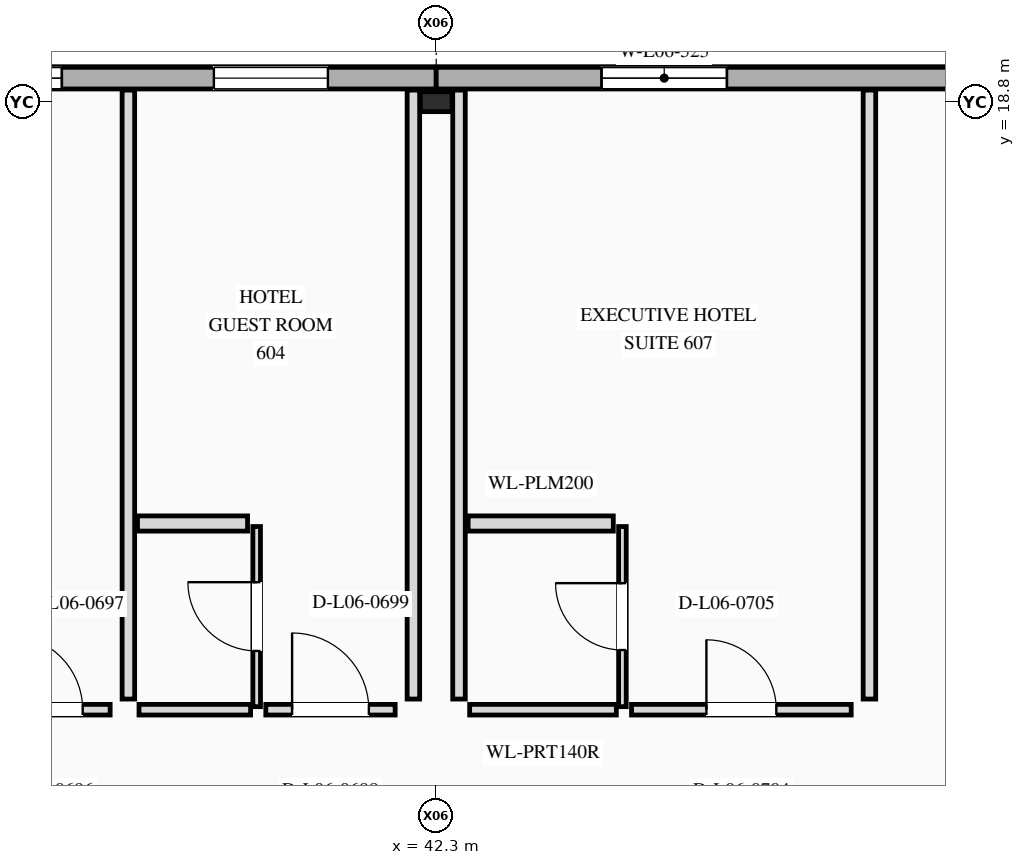
"""IFC4 building model, lengths in metres.
Left out: names, types, materials, properties, quantities, classifications, styles, units other than length and angle.
Written with IfcOpenShell. Run it as: python <this file> out.ifc"""

import sys

from ifc_helpers import new_model, si_unit, direction, frame, frame_2d, origin, origin_2d, place, context, subcontext, project, spatial, rectangle, i_section, extrude, element, fill, save


model = new_model("IFC4")
c1 = context("Model", 3, precision=1e-05, world=origin(), true_north=direction((0.0, 1.0)))
c2 = subcontext(c1, "Body", "Model", "MODEL_VIEW")
j1 = project(units=[si_unit("LENGTHUNIT", "METRE"), si_unit("PLANEANGLEUNIT", "RADIAN")], contexts=[c1])
p1 = place(None, origin())
s1 = spatial("IfcSite", under=j1, at=p1, CompositionType="ELEMENT")
p2 = place(p1, origin())
s2 = spatial("IfcBuilding", under=s1, at=p2, CompositionType="ELEMENT")
p3 = place(p2, frame((0.0, 0.0, 27.0)))
s3 = spatial("IfcBuildingStorey", under=s2, at=p3, CompositionType="ELEMENT", Elevation=27.0)
p4 = place(p3, frame((42.3, 18.8, 0.0), z_axis=(0.0, 0.0, 1.0), x_axis=(0.0, 1.0, 0.0)))
e1 = element("IfcColumn", 1, at=p4, inside=s3, PredefinedType="COLUMN", context=c2, shape_type="SweptSolid", body=[
    extrude(i_section(OverallWidth=0.262, OverallDepth=0.419, WebThickness=0.012, FlangeThickness=0.019, at=origin_2d()), origin(), (0.0, 0.0, 1.0), 3.6),
])
p5 = place(p3, frame((42.3, 19.11, 0.0), z_axis=(0.0, 0.0, 1.0), x_axis=(-1.0, 0.0, 0.0)))
e2 = element("IfcWall", 2, at=p5, inside=s3, PredefinedType="STANDARD", context=c2, shape_type="SweptSolid", body=[
    extrude(rectangle(XDim=8.41, YDim=0.285, at=frame_2d((4.205, 0.0))), origin(), (0.0, 0.0, 1.0), 3.6),
])
p6 = place(p5, frame((4.925, 0.0, 0.85)))
e3 = element("IfcOpeningElement", 3, at=p6, cuts=e2, PredefinedType="OPENING", context=c2, shape_type="SweptSolid", body=[
    extrude(rectangle(XDim=2.0, YDim=1.65, at=frame_2d((1.0, 0.825))), frame((0.0, 0.152, 0.0), z_axis=(0.0, -1.0, 0.0), x_axis=(1.0, 0.0, 0.0)), (0.0, 0.0, 1.0), 0.305),
])
p7 = place(p5, frame((1.425, 0.0, 0.85)))
e4 = element("IfcOpeningElement", 4, at=p7, cuts=e2, PredefinedType="OPENING", context=c2, shape_type="SweptSolid", body=[
    extrude(rectangle(XDim=1.5, YDim=1.7, at=frame_2d((0.75, 0.85))), frame((0.0, 0.152, 0.0), z_axis=(0.0, -1.0, 0.0), x_axis=(1.0, 0.0, 0.0)), (0.0, 0.0, 1.0), 0.305),
])
p8 = place(p3, frame((50.4, 19.11, 0.0), z_axis=(0.0, 0.0, 1.0), x_axis=(-1.0, 0.0, 0.0)))
e5 = element("IfcWall", 5, at=p8, inside=s3, PredefinedType="STANDARD", context=c2, shape_type="SweptSolid", body=[
    extrude(rectangle(XDim=8.1, YDim=0.285, at=frame_2d((4.05, 0.0))), origin(), (0.0, 0.0, 1.0), 3.6),
])
p9 = place(p8, frame((4.275, 0.0, 0.85)))
e6 = element("IfcOpeningElement", 6, at=p9, cuts=e5, PredefinedType="OPENING", context=c2, shape_type="SweptSolid", body=[
    extrude(rectangle(XDim=1.65, YDim=1.75, at=frame_2d((0.825, 0.875))), frame((0.0, 0.152, 0.0), z_axis=(0.0, -1.0, 0.0), x_axis=(1.0, 0.0, 0.0)), (0.0, 0.0, 1.0), 0.305),
])
p10 = place(p3, frame((36.308, 10.8, 0.0), z_axis=(0.0, 0.0, 1.0), x_axis=(1.0, 0.0, 0.0)))
e7 = element("IfcWall", 7, at=p10, inside=s3, PredefinedType="PARTITIONING", context=c2, shape_type="SweptSolid", body=[
    extrude(rectangle(XDim=1.702, YDim=0.14, at=frame_2d((0.851, 0.0))), origin(), (0.0, 0.0, 1.0), 3.29),
])
p11 = place(p10, frame((0.361, 0.0, 0.0)))
e8 = element("IfcOpeningElement", 8, at=p11, cuts=e7, PredefinedType="OPENING", context=c2, shape_type="SweptSolid", body=[
    extrude(rectangle(XDim=0.98, YDim=2.35, at=frame_2d((0.49, 1.175))), frame((0.0, 0.08, 0.0), z_axis=(0.0, -1.0, 0.0), x_axis=(1.0, 0.0, 0.0)), (0.0, 0.0, 1.0), 0.16),
])
p12 = place(p3, frame((38.25, 10.94, 0.0), z_axis=(0.0, 0.0, 1.0), x_axis=(0.0, 1.0, 0.0)))
e9 = element("IfcWall", 9, at=p12, inside=s3, PredefinedType="PARTITIONING", context=c2, shape_type="SweptSolid", body=[
    extrude(rectangle(XDim=8.012, YDim=0.165, at=frame_2d((4.006, 0.0))), origin(), (0.0, 0.0, 1.0), 2.703),
])
p13 = place(p3, frame((38.39, 10.8, 0.0), z_axis=(0.0, 0.0, 1.0), x_axis=(1.0, 0.0, 0.0)))
e10 = element("IfcWall", 10, at=p13, inside=s3, PredefinedType="PARTITIONING", context=c2, shape_type="SweptSolid", body=[
    extrude(rectangle(XDim=1.468, YDim=0.14, at=frame_2d((0.734, 0.0))), origin(), (0.0, 0.0, 1.0), 3.29),
])
p14 = place(p3, frame((40.058, 10.8, 0.0), z_axis=(0.0, 0.0, 1.0), x_axis=(1.0, 0.0, 0.0)))
e11 = element("IfcWall", 11, at=p14, inside=s3, PredefinedType="PARTITIONING", context=c2, shape_type="SweptSolid", body=[
    extrude(rectangle(XDim=1.702, YDim=0.14, at=frame_2d((0.851, 0.0))), origin(), (0.0, 0.0, 1.0), 3.29),
])
p15 = place(p14, frame((0.346, 0.0, 0.0)))
e12 = element("IfcOpeningElement", 12, at=p15, cuts=e11, PredefinedType="OPENING", context=c2, shape_type="SweptSolid", body=[
    extrude(rectangle(XDim=1.01, YDim=2.35, at=frame_2d((0.505, 1.175))), frame((0.0, 0.08, 0.0), z_axis=(0.0, -1.0, 0.0), x_axis=(1.0, 0.0, 0.0)), (0.0, 0.0, 1.0), 0.16),
])
p16 = place(p3, frame((42.0, 10.94, 0.0), z_axis=(0.0, 0.0, 1.0), x_axis=(0.0, 1.0, 0.0)))
e13 = element("IfcWall", 13, at=p16, inside=s3, PredefinedType="PARTITIONING", context=c2, shape_type="SweptSolid", body=[
    extrude(rectangle(XDim=8.012, YDim=0.165, at=frame_2d((4.006, 0.0))), origin(), (0.0, 0.0, 1.0), 2.619),
])
p17 = place(p3, frame((39.938, 10.84, 0.0), z_axis=(0.0, 0.0, 1.0), x_axis=(0.0, 1.0, 0.0)))
e14 = element("IfcWall", 14, at=p17, inside=s3, PredefinedType="PARTITIONING", context=c2, shape_type="SweptSolid", body=[
    extrude(rectangle(XDim=2.37, YDim=0.1, at=frame_2d((1.185, 0.0))), origin(), (0.0, 0.0, 1.0), 2.959),
])
p18 = place(p17, frame((0.733, 0.0, 0.0)))
e15 = element("IfcOpeningElement", 15, at=p18, cuts=e14, PredefinedType="OPENING", context=c2, shape_type="SweptSolid", body=[
    extrude(rectangle(XDim=0.905, YDim=2.1, at=frame_2d((0.453, 1.05))), frame((0.0, 0.06, 0.0), z_axis=(0.0, -1.0, 0.0), x_axis=(1.0, 0.0, 0.0)), (0.0, 0.0, 1.0), 0.12),
])
p19 = place(p3, frame((38.37, 13.25, 0.0), z_axis=(0.0, 0.0, 1.0), x_axis=(1.0, 0.0, 0.0)))
e16 = element("IfcWall", 16, at=p19, inside=s3, PredefinedType="PLUMBINGWALL", context=c2, shape_type="SweptSolid", body=[
    extrude(rectangle(XDim=1.448, YDim=0.2, at=frame_2d((0.724, 0.0))), origin(), (0.0, 0.0, 1.0), 3.29),
])
p20 = place(p3, frame((42.74, 10.8, 0.0), z_axis=(0.0, 0.0, 1.0), x_axis=(1.0, 0.0, 0.0)))
e17 = element("IfcWall", 17, at=p20, inside=s3, PredefinedType="PARTITIONING", context=c2, shape_type="SweptSolid", body=[
    extrude(rectangle(XDim=1.93, YDim=0.14, at=frame_2d((0.965, 0.0))), origin(), (0.0, 0.0, 1.0), 3.29),
])
p21 = place(p3, frame((44.87, 10.8, 0.0), z_axis=(0.0, 0.0, 1.0), x_axis=(1.0, 0.0, 0.0)))
e18 = element("IfcWall", 18, at=p21, inside=s3, PredefinedType="PARTITIONING", context=c2, shape_type="SweptSolid", body=[
    extrude(rectangle(XDim=2.89, YDim=0.14, at=frame_2d((1.445, 0.0))), origin(), (0.0, 0.0, 1.0), 3.29),
])
p22 = place(p21, frame((0.985, 0.0, 0.0)))
e19 = element("IfcOpeningElement", 19, at=p22, cuts=e18, PredefinedType="OPENING", context=c2, shape_type="SweptSolid", body=[
    extrude(rectangle(XDim=0.92, YDim=2.15, at=frame_2d((0.46, 1.075))), frame((0.0, 0.08, 0.0), z_axis=(0.0, -1.0, 0.0), x_axis=(1.0, 0.0, 0.0)), (0.0, 0.0, 1.0), 0.16),
])
p23 = place(p3, frame((42.6, 10.94, 0.0), z_axis=(0.0, 0.0, 1.0), x_axis=(0.0, 1.0, 0.0)))
e20 = element("IfcWall", 20, at=p23, inside=s3, PredefinedType="PARTITIONING", context=c2, shape_type="SweptSolid", body=[
    extrude(rectangle(XDim=8.012, YDim=0.165, at=frame_2d((4.006, 0.0))), origin(), (0.0, 0.0, 1.0), 2.619),
])
p24 = place(p3, frame((48.0, 10.94, 0.0), z_axis=(0.0, 0.0, 1.0), x_axis=(0.0, 1.0, 0.0)))
e21 = element("IfcWall", 21, at=p24, inside=s3, PredefinedType="PARTITIONING", context=c2, shape_type="SweptSolid", body=[
    extrude(rectangle(XDim=8.012, YDim=0.165, at=frame_2d((4.006, 0.0))), origin(), (0.0, 0.0, 1.0), 3.29),
])
p25 = place(p3, frame((44.75, 10.84, 0.0), z_axis=(0.0, 0.0, 1.0), x_axis=(0.0, 1.0, 0.0)))
e22 = element("IfcWall", 22, at=p25, inside=s3, PredefinedType="PARTITIONING", context=c2, shape_type="SweptSolid", body=[
    extrude(rectangle(XDim=2.37, YDim=0.1, at=frame_2d((1.185, 0.0))), origin(), (0.0, 0.0, 1.0), 3.29),
])
p26 = place(p25, frame((0.745, 0.0, 0.0)))
e23 = element("IfcOpeningElement", 23, at=p26, cuts=e22, PredefinedType="OPENING", context=c2, shape_type="SweptSolid", body=[
    extrude(rectangle(XDim=0.88, YDim=2.18, at=frame_2d((0.44, 1.09))), frame((0.0, 0.06, 0.0), z_axis=(0.0, -1.0, 0.0), x_axis=(1.0, 0.0, 0.0)), (0.0, 0.0, 1.0), 0.12),
])
p27 = place(p3, frame((42.72, 13.25, 0.0), z_axis=(0.0, 0.0, 1.0), x_axis=(1.0, 0.0, 0.0)))
e24 = element("IfcWall", 24, at=p27, inside=s3, PredefinedType="PLUMBINGWALL", context=c2, shape_type="SweptSolid", body=[
    extrude(rectangle(XDim=1.91, YDim=0.2, at=frame_2d((0.955, 0.0))), origin(), (0.0, 0.0, 1.0), 3.29),
])
p28 = place(p6, origin())
e25 = element("IfcWindow", 25, at=p28, inside=s3, PartitioningType="SINGLE_PANEL", PredefinedType="WINDOW", context=c2, shape_type="SweptSolid", body=[
    extrude(rectangle(XDim=2.0, YDim=1.65, at=frame_2d((1.0, 0.825))), frame((0.0, 0.03, 0.0), z_axis=(0.0, -1.0, 0.0), x_axis=(1.0, 0.0, 0.0)), (0.0, 0.0, 1.0), 0.06),
])
fill(e3, e25)
p29 = place(p7, origin())
e26 = element("IfcWindow", 26, at=p29, inside=s3, PartitioningType="SINGLE_PANEL", PredefinedType="WINDOW", context=c2, shape_type="SweptSolid", body=[
    extrude(rectangle(XDim=1.5, YDim=1.7, at=frame_2d((0.75, 0.85))), frame((0.0, 0.03, 0.0), z_axis=(0.0, -1.0, 0.0), x_axis=(1.0, 0.0, 0.0)), (0.0, 0.0, 1.0), 0.06),
])
fill(e4, e26)
p30 = place(p9, origin())
e27 = element("IfcWindow", 27, at=p30, inside=s3, PartitioningType="SINGLE_PANEL", PredefinedType="WINDOW", context=c2, shape_type="SweptSolid", body=[
    extrude(rectangle(XDim=1.65, YDim=1.75, at=frame_2d((0.825, 0.875))), frame((0.0, 0.03, 0.0), z_axis=(0.0, -1.0, 0.0), x_axis=(1.0, 0.0, 0.0)), (0.0, 0.0, 1.0), 0.06),
])
fill(e6, e27)
p31 = place(p11, origin())
e28 = element("IfcDoor", 28, at=p31, inside=s3, OperationType="SINGLE_SWING_LEFT", PredefinedType="DOOR", context=c2, shape_type="SweptSolid", body=[
    extrude(rectangle(XDim=0.98, YDim=2.35, at=frame_2d((0.49, 1.175))), frame((0.0, 0.025, 0.0), z_axis=(0.0, -1.0, 0.0), x_axis=(1.0, 0.0, 0.0)), (0.0, 0.0, 1.0), 0.05),
])
fill(e8, e28)
p32 = place(p15, origin())
e29 = element("IfcDoor", 29, at=p32, inside=s3, OperationType="SINGLE_SWING_LEFT", PredefinedType="DOOR", context=c2, shape_type="SweptSolid", body=[
    extrude(rectangle(XDim=1.01, YDim=2.35, at=frame_2d((0.505, 1.175))), frame((0.0, 0.025, 0.0), z_axis=(0.0, -1.0, 0.0), x_axis=(1.0, 0.0, 0.0)), (0.0, 0.0, 1.0), 0.05),
])
fill(e12, e29)
p33 = place(p18, origin())
e30 = element("IfcDoor", 30, at=p33, inside=s3, OperationType="SINGLE_SWING_RIGHT", PredefinedType="DOOR", context=c2, shape_type="SweptSolid", body=[
    extrude(rectangle(XDim=0.905, YDim=2.1, at=frame_2d((0.453, 1.05))), frame((0.0, 0.025, 0.0), z_axis=(0.0, -1.0, 0.0), x_axis=(1.0, 0.0, 0.0)), (0.0, 0.0, 1.0), 0.05),
])
fill(e15, e30)
p34 = place(p22, origin())
e31 = element("IfcDoor", 31, at=p34, inside=s3, OperationType="SINGLE_SWING_LEFT", PredefinedType="DOOR", context=c2, shape_type="SweptSolid", body=[
    extrude(rectangle(XDim=0.92, YDim=2.15, at=frame_2d((0.46, 1.075))), frame((0.0, 0.025, 0.0), z_axis=(0.0, -1.0, 0.0), x_axis=(1.0, 0.0, 0.0)), (0.0, 0.0, 1.0), 0.05),
])
fill(e19, e31)
p35 = place(p26, origin())
e32 = element("IfcDoor", 32, at=p35, inside=s3, OperationType="SINGLE_SWING_RIGHT", PredefinedType="DOOR", context=c2, shape_type="SweptSolid", body=[
    extrude(rectangle(XDim=0.88, YDim=2.18, at=frame_2d((0.44, 1.09))), frame((0.0, 0.025, 0.0), z_axis=(0.0, -1.0, 0.0), x_axis=(1.0, 0.0, 0.0)), (0.0, 0.0, 1.0), 0.05),
])
fill(e23, e32)
save(model, sys.argv[1])
